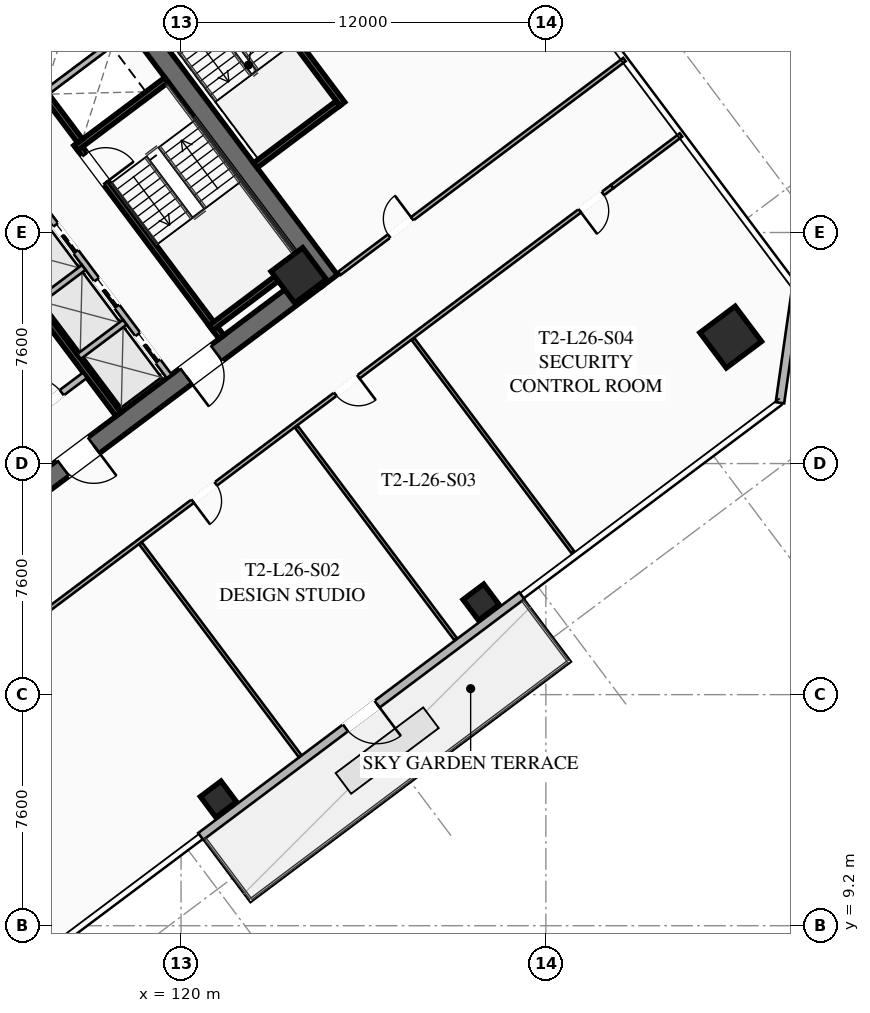
"""IFC4 building model, lengths in metres.
Left out: names, types, materials, properties, quantities, classifications, styles, units other than length and angle.
Written with IfcOpenShell. Run it as: python <this file> out.ifc"""

import sys

from ifc_helpers import new_model, si_unit, direction, frame, frame_2d, origin, origin_2d, place, context, subcontext, project, spatial, rectangle, hollow_rectangle, extrude, element, fill, save


model = new_model("IFC4")
c1 = context("Model", 3, precision=1e-05, world=origin(), true_north=direction((0.0, 1.0)))
c2 = subcontext(c1, "Body", "Model", "MODEL_VIEW")
j1 = project(units=[si_unit("LENGTHUNIT", "METRE"), si_unit("PLANEANGLEUNIT", "RADIAN")], contexts=[c1])
p1 = place(None, origin())
s1 = spatial("IfcSite", under=j1, at=p1, CompositionType="ELEMENT")
p2 = place(p1, origin())
s2 = spatial("IfcBuilding", under=s1, at=p2, CompositionType="ELEMENT")
p3 = place(p2, frame((0.0, 0.0, 99.15)))
s3 = spatial("IfcBuildingStorey", under=s2, at=p3, CompositionType="ELEMENT", Elevation=99.15)
p4 = place(p3, frame((115.524, 42.893, 0.0), z_axis=(0.0, 0.0, 1.0), x_axis=(0.600005007985, -0.799996243986, 0.0)))
e1 = element("IfcWall", 1, at=p4, inside=s3, PredefinedType="SHEAR", context=c2, shape_type="SweptSolid", body=[
    extrude(rectangle(XDim=15.6, YDim=0.65, at=frame_2d((7.8, 0.0))), origin(), (0.0, 0.0, 1.0), 3.55),
])
p5 = place(p3, frame((124.429, 30.478, 0.0), z_axis=(0.0, 0.0, 1.0), x_axis=(-0.799998028465, -0.600002628705, 0.0)))
e2 = element("IfcWall", 2, at=p5, inside=s3, PredefinedType="SHEAR", context=c2, shape_type="SweptSolid", body=[
    extrude(rectangle(XDim=14.86, YDim=0.65, at=frame_2d((7.43, 0.0))), origin(), (0.0, 0.0, 1.0), 3.55),
])
p6 = place(p5, frame((9.13, 0.0, 0.0)))
e3 = element("IfcOpeningElement", 3, at=p6, cuts=e2, PredefinedType="OPENING", context=c2, shape_type="SweptSolid", body=[
    extrude(rectangle(XDim=1.25, YDim=2.25, at=frame_2d((0.625, 1.125))), frame((0.0, 0.335, 0.0), z_axis=(0.0, -1.0, 0.0), x_axis=(1.0, 0.0, 0.0)), (0.0, 0.0, 1.0), 0.67),
])
p7 = place(p5, frame((4.08, 0.0, 0.0)))
e4 = element("IfcOpeningElement", 4, at=p7, cuts=e2, PredefinedType="OPENING", context=c2, shape_type="SweptSolid", body=[
    extrude(rectangle(XDim=1.25, YDim=2.25, at=frame_2d((0.625, 1.125))), frame((0.0, 0.335, 0.0), z_axis=(0.0, -1.0, 0.0), x_axis=(1.0, 0.0, 0.0)), (0.0, 0.0, 1.0), 0.67),
])
p8 = place(p3, frame((123.87, 30.59, 0.0), z_axis=(0.0, 0.0, 1.0), x_axis=(0.799999996291, 0.600000004945, 0.0)))
e5 = element("IfcColumn", 5, at=p8, inside=s3, PredefinedType="COLUMN", context=c2, shape_type="SweptSolid", body=[
    extrude(hollow_rectangle(XDim=1.3, YDim=1.3, WallThickness=0.05, at=origin_2d()), origin(), (0.0, 0.0, 1.0), 3.35),
])
p9 = place(p3, frame((138.08, 28.56, 0.0), z_axis=(0.0, 0.0, 1.0), x_axis=(0.799999996291, 0.600000004945, 0.0)))
e6 = element("IfcColumn", 6, at=p9, inside=s3, PredefinedType="COLUMN", context=c2, shape_type="SweptSolid", body=[
    extrude(hollow_rectangle(XDim=1.45, YDim=1.45, WallThickness=0.055, at=origin_2d()), origin(), (0.0, 0.0, 1.0), 3.35),
])
for number, where, z_axis, x_axis in (
    (7, (121.23, 13.36, 0.0), (0.0, 0.0, 1.0), (0.8, 0.6, 0.0)),
    (8, (129.87, 19.84, 0.0), (0.0, 0.0, 1.0), (0.8, 0.6, 0.0)),
):
    element("IfcColumn", number, at=place(p3, frame(where, z_axis=z_axis, x_axis=x_axis)), inside=s3, PredefinedType="COLUMN", context=c2, shape_type="SweptSolid", body=[
        extrude(hollow_rectangle(XDim=0.85, YDim=0.85, WallThickness=0.035, at=origin_2d()), origin(), (0.0, 0.0, 1.0), 3.35),
    ])
p10 = place(p3, frame((131.208, 20.056, 0.0), z_axis=(0.0, 0.0, 1.0), x_axis=(-0.800004438899, -0.599994081423, 0.0)))
e9 = element("IfcWall", 9, at=p10, inside=s3, PredefinedType="SOLIDWALL", context=c2, shape_type="SweptSolid", body=[
    extrude(rectangle(XDim=13.2, YDim=0.28, at=frame_2d((6.6, 0.0))), origin(), (0.0, 0.0, 1.0), 3.35),
])
p11 = place(p10, frame((5.95, 0.0, 0.0)))
e10 = element("IfcOpeningElement", 10, at=p11, cuts=e9, PredefinedType="OPENING", context=c2, shape_type="SweptSolid", body=[
    extrude(rectangle(XDim=1.3, YDim=2.15, at=frame_2d((0.65, 1.075))), frame((0.0, 0.15, 0.0), z_axis=(0.0, -1.0, 0.0), x_axis=(1.0, 0.0, 0.0)), (0.0, 0.0, 1.0), 0.3),
])
p12 = place(p3, frame((140.24, 30.18, 0.0), z_axis=(0.0, 0.0, 1.0), x_axis=(-0.141430307517, -0.989948214866, 0.0)))
e11 = element("IfcWall", 11, at=p12, inside=s3, PredefinedType="SOLIDWALL", context=c2, shape_type="SweptSolid", body=[
    extrude(rectangle(XDim=3.818, YDim=0.28, at=frame_2d((1.909, 0.0))), origin(), (0.0, 0.0, 1.0), 3.35),
])
p13 = place(p3, frame((116.56, 34.92, 0.0), z_axis=(0.0, 0.0, 1.0), x_axis=(0.600009827119, -0.799992629566, 0.0)))
e12 = element("IfcWall", 12, at=p13, inside=s3, PredefinedType="SHEAR", context=c2, shape_type="SweptSolid", body=[
    extrude(rectangle(XDim=7.95, YDim=0.2, at=frame_2d((3.975, 0.0))), origin(), (0.0, 0.0, 1.0), 3.35),
])
p14 = place(p13, frame((0.45, 0.0, 0.0)))
e13 = element("IfcOpeningElement", 13, at=p14, cuts=e12, PredefinedType="OPENING", context=c2, shape_type="SweptSolid", body=[
    extrude(rectangle(XDim=1.15, YDim=2.2, at=frame_2d((0.575, 1.1))), frame((0.0, 0.11, 0.0), z_axis=(0.0, -1.0, 0.0), x_axis=(1.0, 0.0, 0.0)), (0.0, 0.0, 1.0), 0.22),
])
for number, where, z_axis, x_axis in (
    (14, (116.54, 34.78, 0.0), (0.0, 0.0, 1.0), (0.8, 0.6, 0.0)),
    (15, (120.98, 28.86, 0.0), (0.0, 0.0, 1.0), (0.8, 0.6, 0.0)),
):
    element("IfcWall", number, at=place(p3, frame(where, z_axis=z_axis, x_axis=x_axis)), inside=s3, PredefinedType="SHEAR", context=c2, shape_type="SweptSolid", body=[
        extrude(rectangle(XDim=3.73, YDim=0.2, at=frame_2d((1.865, 0.0))), origin(), (0.0, 0.0, 1.0), 3.35),
    ])
p15 = place(p3, frame((117.938, 26.016, 0.0), z_axis=(0.0, 0.0, 1.0), x_axis=(-0.600005463273, 0.799995902516, 0.0)))
e16 = element("IfcWall", 16, at=p15, inside=s3, PredefinedType="SHEAR", context=c2, shape_type="SweptSolid", body=[
    extrude(rectangle(XDim=14.3, YDim=0.2, at=frame_2d((7.15, 0.0))), origin(), (0.0, 0.0, 1.0), 3.35),
])
p16 = place(p3, frame((114.316, 25.412, 0.0), z_axis=(0.0, 0.0, 1.0), x_axis=(0.800018601094, 0.59997519774, 0.0)))
e17 = element("IfcWall", 17, at=p16, inside=s3, PredefinedType="SOLIDWALL", context=c2, shape_type="SweptSolid", body=[
    extrude(rectangle(XDim=3.15, YDim=0.22, at=frame_2d((1.575, 0.0))), origin(), (0.0, 0.0, 1.0), 2.703),
])
p17 = place(p16, frame((0.95, 0.0, 0.0)))
e18 = element("IfcOpeningElement", 18, at=p17, cuts=e17, PredefinedType="OPENING", context=c2, shape_type="SweptSolid", body=[
    extrude(rectangle(XDim=1.25, YDim=2.25, at=frame_2d((0.625, 1.125))), frame((0.0, 0.12, 0.0), z_axis=(0.0, -1.0, 0.0), x_axis=(1.0, 0.0, 0.0)), (0.0, 0.0, 1.0), 0.24),
])
p18 = place(p3, frame((112.87, 40.09, 0.0), z_axis=(0.0, 0.0, 1.0), x_axis=(0.599975393228, -0.800018454488, 0.0)))
e19 = element("IfcWall", 19, at=p18, inside=s3, PredefinedType="SHEAR", context=c2, shape_type="SweptSolid", body=[
    extrude(rectangle(XDim=6.35, YDim=0.2, at=frame_2d((3.175, 0.0))), origin(), (0.0, 0.0, 1.0), 3.35),
])
p19 = place(p3, frame((115.59, 36.63, 0.0), z_axis=(0.0, 0.0, 1.0), x_axis=(0.799973995579, 0.600034670996, 0.0)))
e20 = element("IfcWall", 20, at=p19, inside=s3, PredefinedType="SOLIDWALL", context=c2, shape_type="SweptSolid", body=[
    extrude(rectangle(XDim=3.38, YDim=0.2, at=frame_2d((1.69, 0.0))), origin(), (0.0, 0.0, 1.0), 3.35),
])
p20 = place(p3, frame((119.61, 27.27, 0.0), z_axis=(0.0, 0.0, 1.0), x_axis=(-0.600011488909, 0.79999138319, 0.0)))
e21 = element("IfcWall", 21, at=p20, inside=s3, PredefinedType="SOLIDWALL", context=c2, shape_type="SweptSolid", body=[
    extrude(rectangle(XDim=6.8, YDim=0.2, at=frame_2d((3.4, 0.0))), origin(), (0.0, 0.0, 1.0), 3.35),
])
p21 = place(p20, frame((0.625, 0.0, 0.0)))
e22 = element("IfcOpeningElement", 22, at=p21, cuts=e21, PredefinedType="OPENING", context=c2, shape_type="SweptSolid", body=[
    extrude(rectangle(XDim=1.1, YDim=2.2, at=frame_2d((0.55, 1.1))), frame((0.0, 0.11, 0.0), z_axis=(0.0, -1.0, 0.0), x_axis=(1.0, 0.0, 0.0)), (0.0, 0.0, 1.0), 0.22),
])
p22 = place(p20, frame((2.875, 0.0, 0.0)))
e23 = element("IfcOpeningElement", 23, at=p22, cuts=e21, PredefinedType="OPENING", context=c2, shape_type="SweptSolid", body=[
    extrude(rectangle(XDim=1.1, YDim=2.2, at=frame_2d((0.55, 1.1))), frame((0.0, 0.11, 0.0), z_axis=(0.0, -1.0, 0.0), x_axis=(1.0, 0.0, 0.0)), (0.0, 0.0, 1.0), 0.22),
])
p23 = place(p20, frame((5.125, 0.0, 0.0)))
e24 = element("IfcOpeningElement", 24, at=p23, cuts=e21, PredefinedType="OPENING", context=c2, shape_type="SweptSolid", body=[
    extrude(rectangle(XDim=1.1, YDim=2.2, at=frame_2d((0.55, 1.1))), frame((0.0, 0.11, 0.0), z_axis=(0.0, -1.0, 0.0), x_axis=(1.0, 0.0, 0.0)), (0.0, 0.0, 1.0), 0.22),
])
p24 = place(p3, frame((116.646, 27.922, 0.0), z_axis=(0.0, 0.0, 1.0), x_axis=(0.8, 0.6, 0.0)))
e25 = element("IfcWall", 25, at=p24, inside=s3, PredefinedType="SOLIDWALL", context=c2, shape_type="SweptSolid", body=[
    extrude(rectangle(XDim=1.88, YDim=0.2, at=frame_2d((0.94, 0.0))), origin(), (0.0, 0.0, 1.0), 3.35),
])
p25 = place(p3, frame((115.296, 29.722, 0.0), z_axis=(0.0, 0.0, 1.0), x_axis=(0.799984418148, 0.600020775241, 0.0)))
e26 = element("IfcWall", 26, at=p25, inside=s3, PredefinedType="SOLIDWALL", context=c2, shape_type="SweptSolid", body=[
    extrude(rectangle(XDim=1.88, YDim=0.2, at=frame_2d((0.94, 0.0))), origin(), (0.0, 0.0, 1.0), 3.35),
])
p26 = place(p3, frame((125.304, 36.228, 0.0), z_axis=(0.0, 0.0, 1.0), x_axis=(-0.59998851072, 0.800008616831, 0.0)))
e27 = element("IfcWall", 27, at=p26, inside=s3, PredefinedType="SHEAR", context=c2, shape_type="SweptSolid", body=[
    extrude(rectangle(XDim=6.8, YDim=0.2, at=frame_2d((3.4, 0.0))), origin(), (0.0, 0.0, 1.0), 3.35),
])
p27 = place(p3, frame((122.444, 34.208, 0.0), z_axis=(0.0, 0.0, 1.0), x_axis=(0.79999138319, 0.600011488909, 0.0)))
e28 = element("IfcWall", 28, at=p27, inside=s3, PredefinedType="SHEAR", context=c2, shape_type="SweptSolid", body=[
    extrude(rectangle(XDim=3.4, YDim=0.2, at=frame_2d((1.7, 0.0))), origin(), (0.0, 0.0, 1.0), 3.35),
])
p28 = place(p3, frame((98.516, 34.012, 0.0), z_axis=(0.0, 0.0, 1.0), x_axis=(0.8, 0.6, 0.0)))
e29 = element("IfcWall", 29, at=p28, inside=s3, PredefinedType="PARTITIONING", context=c2, shape_type="SweptSolid", body=[
    extrude(rectangle(XDim=28.23, YDim=0.135, at=frame_2d((14.115, 0.0))), origin(), (0.0, 0.0, 1.0), 2.703),
])
p29 = place(p28, frame((0.3, 0.0, 0.0)))
e30 = element("IfcOpeningElement", 30, at=p29, cuts=e29, PredefinedType="OPENING", context=c2, shape_type="SweptSolid", body=[
    extrude(rectangle(XDim=0.95, YDim=2.05, at=frame_2d((0.475, 1.025))), frame((0.0, 0.077, 0.0), z_axis=(0.0, -1.0, 0.0), x_axis=(1.0, 0.0, 0.0)), (0.0, 0.0, 1.0), 0.155),
])
p30 = place(p28, frame((10.962, 0.0, 0.0)))
e31 = element("IfcOpeningElement", 31, at=p30, cuts=e29, PredefinedType="OPENING", context=c2, shape_type="SweptSolid", body=[
    extrude(rectangle(XDim=0.95, YDim=2.05, at=frame_2d((0.475, 1.025))), frame((0.0, 0.077, 0.0), z_axis=(0.0, -1.0, 0.0), x_axis=(1.0, 0.0, 0.0)), (0.0, 0.0, 1.0), 0.155),
])
p31 = place(p28, frame((26.98, 0.0, 0.0)))
e32 = element("IfcOpeningElement", 32, at=p31, cuts=e29, PredefinedType="OPENING", context=c2, shape_type="SweptSolid", body=[
    extrude(rectangle(XDim=0.95, YDim=2.05, at=frame_2d((0.475, 1.025))), frame((0.0, 0.077, 0.0), z_axis=(0.0, -1.0, 0.0), x_axis=(1.0, 0.0, 0.0)), (0.0, 0.0, 1.0), 0.155),
])
p32 = place(p3, frame((134.18, 33.51, 0.0), z_axis=(0.0, 0.0, 1.0), x_axis=(-0.8, -0.6, 0.0)))
e33 = element("IfcWall", 33, at=p32, inside=s3, PredefinedType="PARTITIONING", context=c2, shape_type="SweptSolid", body=[
    extrude(rectangle(XDim=28.23, YDim=0.135, at=frame_2d((14.115, 0.0))), origin(), (0.0, 0.0, 1.0), 2.703),
])
p33 = place(p32, frame((26.9, 0.0, 0.0)))
e34 = element("IfcOpeningElement", 34, at=p33, cuts=e33, PredefinedType="OPENING", context=c2, shape_type="SweptSolid", body=[
    extrude(rectangle(XDim=0.95, YDim=2.05, at=frame_2d((0.475, 1.025))), frame((0.0, 0.077, 0.0), z_axis=(0.0, -1.0, 0.0), x_axis=(1.0, 0.0, 0.0)), (0.0, 0.0, 1.0), 0.155),
])
p34 = place(p32, frame((16.296, 0.0, 0.0)))
e35 = element("IfcOpeningElement", 35, at=p34, cuts=e33, PredefinedType="OPENING", context=c2, shape_type="SweptSolid", body=[
    extrude(rectangle(XDim=0.95, YDim=2.05, at=frame_2d((0.475, 1.025))), frame((0.0, 0.077, 0.0), z_axis=(0.0, -1.0, 0.0), x_axis=(1.0, 0.0, 0.0)), (0.0, 0.0, 1.0), 0.155),
])
p35 = place(p32, frame((10.433, 0.0, 0.0)))
e36 = element("IfcOpeningElement", 36, at=p35, cuts=e33, PredefinedType="OPENING", context=c2, shape_type="SweptSolid", body=[
    extrude(rectangle(XDim=0.95, YDim=2.05, at=frame_2d((0.475, 1.025))), frame((0.0, 0.077, 0.0), z_axis=(0.0, -1.0, 0.0), x_axis=(1.0, 0.0, 0.0)), (0.0, 0.0, 1.0), 0.155),
])
p36 = place(p32, frame((0.38, 0.0, 0.0)))
e37 = element("IfcOpeningElement", 37, at=p36, cuts=e33, PredefinedType="OPENING", context=c2, shape_type="SweptSolid", body=[
    extrude(rectangle(XDim=0.95, YDim=2.05, at=frame_2d((0.475, 1.025))), frame((0.0, 0.077, 0.0), z_axis=(0.0, -1.0, 0.0), x_axis=(1.0, 0.0, 0.0)), (0.0, 0.0, 1.0), 0.155),
])
p37 = place(p3, frame((134.18, 33.51, 0.0), z_axis=(0.0, 0.0, 1.0), x_axis=(0.8000207031, 0.599972394874, 0.0)))
e38 = element("IfcWall", 38, at=p37, inside=s3, PredefinedType="PARTITIONING", context=c2, shape_type="SweptSolid", body=[
    extrude(rectangle(XDim=2.83, YDim=0.135, at=frame_2d((1.415, 0.0))), origin(), (0.0, 0.0, 1.0), 2.703),
])
for number, where, z_axis, x_axis in (
    (39, (123.918, 14.776, 0.0), (0.0, 0.0, 1.0), (-0.6, 0.8, 0.0)),
    (40, (129.038, 18.616, 0.0), (0.0, 0.0, 1.0), (-0.6, 0.8, 0.0)),
    (41, (132.878, 21.496, 0.0), (0.0, 0.0, 1.0), (-0.6, 0.8, 0.0)),
):
    element("IfcWall", number, at=place(p3, frame(where, z_axis=z_axis, x_axis=x_axis)), inside=s3, PredefinedType="PARTITIONING", context=c2, shape_type="SweptSolid", body=[
        extrude(rectangle(XDim=8.75, YDim=0.11, at=frame_2d((4.375, 0.0))), origin(), (0.0, 0.0, 1.0), 2.703),
    ])
p38 = place(p3, frame((125.208, 30.656, 0.0), z_axis=(0.0, 0.0, 1.0), x_axis=(0.8, 0.6, 0.0)))
e42 = element("IfcWall", 42, at=p38, inside=s3, PredefinedType="PARTITIONING", context=c2, shape_type="SweptSolid", body=[
    extrude(rectangle(XDim=11.72, YDim=0.135, at=frame_2d((5.86, 0.0))), origin(), (0.0, 0.0, 1.0), 2.703),
])
p39 = place(p38, frame((2.045, 0.0, 0.0)))
e43 = element("IfcOpeningElement", 43, at=p39, cuts=e42, PredefinedType="OPENING", context=c2, shape_type="SweptSolid", body=[
    extrude(rectangle(XDim=0.95, YDim=2.05, at=frame_2d((0.475, 1.025))), frame((0.0, 0.077, 0.0), z_axis=(0.0, -1.0, 0.0), x_axis=(1.0, 0.0, 0.0)), (0.0, 0.0, 1.0), 0.155),
])
p40 = place(p11, origin())
e44 = element("IfcDoor", 44, at=p40, inside=s3, OperationType="SINGLE_SWING_LEFT", PredefinedType="DOOR", context=c2, shape_type="SweptSolid", body=[
    extrude(rectangle(XDim=1.3, YDim=2.15, at=frame_2d((0.65, 1.075))), frame((0.0, 0.025, 0.0), z_axis=(0.0, -1.0, 0.0), x_axis=(1.0, 0.0, 0.0)), (0.0, 0.0, 1.0), 0.05),
])
fill(e10, e44)
p41 = place(p6, origin())
e45 = element("IfcDoor", 45, at=p41, inside=s3, OperationType="SINGLE_SWING_LEFT", PredefinedType="DOOR", context=c2, shape_type="SweptSolid", body=[
    extrude(rectangle(XDim=1.25, YDim=2.25, at=frame_2d((0.625, 1.125))), frame((0.0, 0.025, 0.0), z_axis=(0.0, -1.0, 0.0), x_axis=(1.0, 0.0, 0.0)), (0.0, 0.0, 1.0), 0.05),
])
fill(e3, e45)
p42 = place(p7, origin())
e46 = element("IfcDoor", 46, at=p42, inside=s3, OperationType="SINGLE_SWING_RIGHT", PredefinedType="DOOR", context=c2, shape_type="SweptSolid", body=[
    extrude(rectangle(XDim=1.25, YDim=2.25, at=frame_2d((0.625, 1.125))), frame((0.0, 0.025, 0.0), z_axis=(0.0, -1.0, 0.0), x_axis=(1.0, 0.0, 0.0)), (0.0, 0.0, 1.0), 0.05),
])
fill(e4, e46)
p43 = place(p14, origin())
e47 = element("IfcDoor", 47, at=p43, inside=s3, OperationType="SINGLE_SWING_RIGHT", PredefinedType="DOOR", context=c2, shape_type="SweptSolid", body=[
    extrude(rectangle(XDim=1.15, YDim=2.2, at=frame_2d((0.575, 1.1))), frame((0.0, 0.025, 0.0), z_axis=(0.0, -1.0, 0.0), x_axis=(1.0, 0.0, 0.0)), (0.0, 0.0, 1.0), 0.05),
])
fill(e13, e47)
p44 = place(p17, origin())
e48 = element("IfcDoor", 48, at=p44, inside=s3, OperationType="SINGLE_SWING_LEFT", PredefinedType="DOOR", context=c2, shape_type="SweptSolid", body=[
    extrude(rectangle(XDim=1.25, YDim=2.25, at=frame_2d((0.625, 1.125))), frame((0.0, 0.025, 0.0), z_axis=(0.0, -1.0, 0.0), x_axis=(1.0, 0.0, 0.0)), (0.0, 0.0, 1.0), 0.05),
])
fill(e18, e48)
p45 = place(p34, origin())
e49 = element("IfcDoor", 49, at=p45, inside=s3, OperationType="SINGLE_SWING_RIGHT", PredefinedType="DOOR", context=c2, shape_type="SweptSolid", body=[
    extrude(rectangle(XDim=0.95, YDim=2.05, at=frame_2d((0.475, 1.025))), frame((0.0, 0.025, 0.0), z_axis=(0.0, -1.0, 0.0), x_axis=(1.0, 0.0, 0.0)), (0.0, 0.0, 1.0), 0.05),
])
fill(e35, e49)
p46 = place(p35, origin())
e50 = element("IfcDoor", 50, at=p46, inside=s3, OperationType="SINGLE_SWING_LEFT", PredefinedType="DOOR", context=c2, shape_type="SweptSolid", body=[
    extrude(rectangle(XDim=0.95, YDim=2.05, at=frame_2d((0.475, 1.025))), frame((0.0, 0.025, 0.0), z_axis=(0.0, -1.0, 0.0), x_axis=(1.0, 0.0, 0.0)), (0.0, 0.0, 1.0), 0.05),
])
fill(e36, e50)
p47 = place(p36, origin())
e51 = element("IfcDoor", 51, at=p47, inside=s3, OperationType="SINGLE_SWING_RIGHT", PredefinedType="DOOR", context=c2, shape_type="SweptSolid", body=[
    extrude(rectangle(XDim=0.95, YDim=2.05, at=frame_2d((0.475, 1.025))), frame((0.0, 0.025, 0.0), z_axis=(0.0, -1.0, 0.0), x_axis=(1.0, 0.0, 0.0)), (0.0, 0.0, 1.0), 0.05),
])
fill(e37, e51)
p48 = place(p39, origin())
e52 = element("IfcDoor", 52, at=p48, inside=s3, OperationType="SINGLE_SWING_RIGHT", PredefinedType="DOOR", context=c2, shape_type="SweptSolid", body=[
    extrude(rectangle(XDim=0.95, YDim=2.05, at=frame_2d((0.475, 1.025))), frame((0.0, 0.025, 0.0), z_axis=(0.0, -1.0, 0.0), x_axis=(1.0, 0.0, 0.0)), (0.0, 0.0, 1.0), 0.05),
])
fill(e43, e52)
p49 = place(p21, origin())
e53 = element("IfcDoor", 53, at=p49, inside=s3, OperationType="SLIDING_TO_LEFT", PredefinedType="DOOR", context=c2, shape_type="SweptSolid", body=[
    extrude(rectangle(XDim=1.1, YDim=2.2, at=frame_2d((0.55, 1.1))), frame((0.0, 0.025, 0.0), z_axis=(0.0, -1.0, 0.0), x_axis=(1.0, 0.0, 0.0)), (0.0, 0.0, 1.0), 0.05),
])
fill(e22, e53)
p50 = place(p22, origin())
e54 = element("IfcDoor", 54, at=p50, inside=s3, OperationType="SLIDING_TO_LEFT", PredefinedType="DOOR", context=c2, shape_type="SweptSolid", body=[
    extrude(rectangle(XDim=1.1, YDim=2.2, at=frame_2d((0.55, 1.1))), frame((0.0, 0.025, 0.0), z_axis=(0.0, -1.0, 0.0), x_axis=(1.0, 0.0, 0.0)), (0.0, 0.0, 1.0), 0.05),
])
fill(e23, e54)
p51 = place(p23, origin())
e55 = element("IfcDoor", 55, at=p51, inside=s3, OperationType="SLIDING_TO_LEFT", PredefinedType="DOOR", context=c2, shape_type="SweptSolid", body=[
    extrude(rectangle(XDim=1.1, YDim=2.2, at=frame_2d((0.55, 1.1))), frame((0.0, 0.025, 0.0), z_axis=(0.0, -1.0, 0.0), x_axis=(1.0, 0.0, 0.0)), (0.0, 0.0, 1.0), 0.05),
])
fill(e24, e55)
save(model, sys.argv[1])
